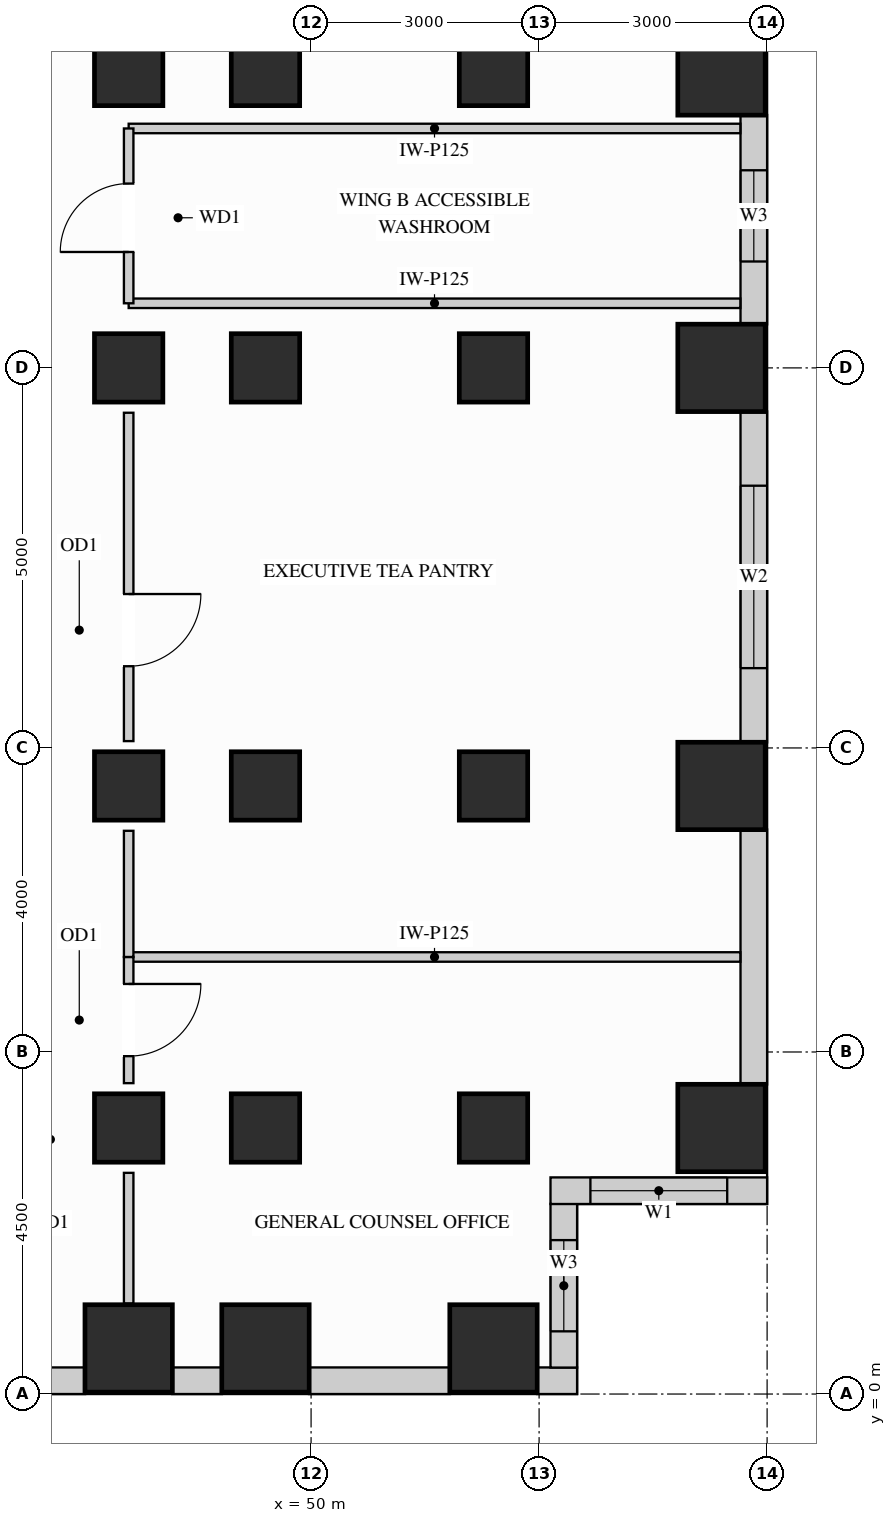
"""IFC4 building model, lengths in metres.
Left out: names, types, materials, properties, quantities, classifications, styles, units other than length and angle.
Written with IfcOpenShell. Run it as: python <this file> out.ifc"""

import sys

from ifc_helpers import new_model, si_unit, direction, frame, frame_2d, origin, origin_2d, place, context, subcontext, project, spatial, rectangle, extrude, source, transform, mapped, element, fill, save


model = new_model("IFC4")
c1 = context("Model", 3, precision=1e-05, world=origin(), true_north=direction((0.0, 1.0)))
c2 = subcontext(c1, "Body", "Model", "MODEL_VIEW")
j1 = project(units=[si_unit("LENGTHUNIT", "METRE"), si_unit("PLANEANGLEUNIT", "RADIAN")], contexts=[c1])
p1 = place(None, origin())
s1 = spatial("IfcSite", under=j1, at=p1, CompositionType="ELEMENT")
p2 = place(p1, origin())
s2 = spatial("IfcBuilding", under=s1, at=p2, CompositionType="ELEMENT")
p3 = place(p2, frame((0.0, 0.0, 88.2)))
s3 = spatial("IfcBuildingStorey", under=s2, at=p3, CompositionType="ELEMENT", Elevation=88.2)
m1 = source(origin(), c2, "Body", "SweptSolid", [
    extrude(rectangle(XDim=0.9, YDim=0.9, at=origin_2d()), origin(), (0.0, 0.0, 1.0), 3.38),
])
for number, where, z_axis, x_axis in (
    (1, (47.6, 13.5, 0.0), (0.0, 0.0, 1.0), (1.0, 0.0, 0.0)),
    (2, (47.6, 3.5, 0.0), (0.0, 0.0, 1.0), (1.0, 0.0, 0.0)),
    (3, (47.6, 8.0, 0.0), (0.0, 0.0, 1.0), (1.0, 0.0, 0.0)),
    (4, (47.6, 17.4, 0.0), (0.0, 0.0, 1.0), (1.0, 0.0, 0.0)),
    (5, (49.4, 13.5, 0.0), (0.0, 0.0, 1.0), (1.0, 0.0, 0.0)),
    (6, (49.4, 17.4, 0.0), (0.0, 0.0, 1.0), (1.0, 0.0, 0.0)),
    (7, (49.4, 3.5, 0.0), (0.0, 0.0, 1.0), (1.0, 0.0, 0.0)),
    (8, (49.4, 8.0, 0.0), (0.0, 0.0, 1.0), (1.0, 0.0, 0.0)),
    (9, (52.4, 13.5, 0.0), (0.0, 0.0, 1.0), (1.0, 0.0, 0.0)),
    (10, (52.4, 17.4, 0.0), (0.0, 0.0, 1.0), (1.0, 0.0, 0.0)),
    (11, (52.4, 3.5, 0.0), (0.0, 0.0, 1.0), (1.0, 0.0, 0.0)),
    (12, (52.4, 8.0, 0.0), (0.0, 0.0, 1.0), (1.0, 0.0, 0.0)),
):
    element("IfcColumn", number, at=place(p3, frame(where, z_axis=z_axis, x_axis=x_axis)), inside=s3, PredefinedType="COLUMN", context=c2, shape_type="MappedRepresentation", body=[
        mapped(m1, transform((0.0, 0.0, 0.0), x_axis=(1.0, 0.0, 0.0), y_axis=(0.0, 1.0, 0.0), z_axis=(0.0, 0.0, 1.0))),
    ])
m2 = source(origin(), c2, "Body", "SweptSolid", [
    extrude(rectangle(XDim=1.15, YDim=1.15, at=origin_2d()), origin(), (0.0, 0.0, 1.0), 3.38),
])
for number, where, z_axis, x_axis in (
    (13, (55.4, 13.5, 0.0), (0.0, 0.0, 1.0), (1.0, 0.0, 0.0)),
    (14, (55.4, 17.4, 0.0), (0.0, 0.0, 1.0), (1.0, 0.0, 0.0)),
    (15, (55.4, 3.5, 0.0), (0.0, 0.0, 1.0), (1.0, 0.0, 0.0)),
    (16, (55.4, 8.0, 0.0), (0.0, 0.0, 1.0), (1.0, 0.0, 0.0)),
    (17, (47.6, 0.6, 0.0), (0.0, 0.0, 1.0), (1.0, 0.0, 0.0)),
    (18, (49.4, 0.6, 0.0), (0.0, 0.0, 1.0), (1.0, 0.0, 0.0)),
    (19, (52.4, 0.6, 0.0), (0.0, 0.0, 1.0), (1.0, 0.0, 0.0)),
):
    element("IfcColumn", number, at=place(p3, frame(where, z_axis=z_axis, x_axis=x_axis)), inside=s3, PredefinedType="COLUMN", context=c2, shape_type="MappedRepresentation", body=[
        mapped(m2, transform((0.0, 0.0, 0.0), x_axis=(1.0, 0.0, 0.0), y_axis=(0.0, 1.0, 0.0), z_axis=(0.0, 0.0, 1.0))),
    ])
p4 = place(p3, frame((40.573, 0.175, 0.0), z_axis=(0.0, 0.0, 1.0), x_axis=(1.0, 0.0, 0.0)))
e20 = element("IfcWall", 20, at=p4, inside=s3, PredefinedType="SOLIDWALL", context=c2, shape_type="SweptSolid", body=[
    extrude(rectangle(XDim=6.454, YDim=0.35, at=frame_2d((3.227, 0.0))), origin(), (0.0, 0.0, 1.0), 2.428),
])
p5 = place(p4, frame((0.712, 0.0, 0.78)))
e21 = element("IfcOpeningElement", 21, at=p5, cuts=e20, PredefinedType="OPENING", context=c2, shape_type="SweptSolid", body=[
    extrude(rectangle(XDim=1.8, YDim=1.468, at=frame_2d((0.9, 0.734))), frame((0.0, 0.185, 0.0), z_axis=(0.0, -1.0, 0.0), x_axis=(1.0, 0.0, 0.0)), (0.0, 0.0, 1.0), 0.37),
])
p6 = place(p4, frame((2.905, 0.0, 0.78)))
e22 = element("IfcOpeningElement", 22, at=p6, cuts=e20, PredefinedType="OPENING", context=c2, shape_type="SweptSolid", body=[
    extrude(rectangle(XDim=1.8, YDim=1.468, at=frame_2d((0.9, 0.734))), frame((0.0, 0.185, 0.0), z_axis=(0.0, -1.0, 0.0), x_axis=(1.0, 0.0, 0.0)), (0.0, 0.0, 1.0), 0.37),
])
m3 = source(origin(), c2, "Body", "SweptSolid", [
    extrude(rectangle(XDim=0.654, YDim=0.35, at=frame_2d((0.327, 0.0))), origin(), (0.0, 0.0, 1.0), 3.365),
])
p7 = place(p3, frame((48.173, 0.175, 0.0), z_axis=(0.0, 0.0, 1.0), x_axis=(1.0, 0.0, 0.0)))
e23 = element("IfcWall", 23, at=p7, inside=s3, PredefinedType="SOLIDWALL", context=c2, shape_type="MappedRepresentation", body=[
    mapped(m3, transform((0.0, 0.0, 0.0), x_axis=(1.0, 0.0, 0.0), y_axis=(0.0, 1.0, 0.0), z_axis=(0.0, 0.0, 1.0))),
])
m4 = source(origin(), c2, "Body", "SweptSolid", [
    extrude(rectangle(XDim=1.854, YDim=0.35, at=frame_2d((0.927, 0.0))), origin(), (0.0, 0.0, 1.0), 3.365),
])
p8 = place(p3, frame((49.973, 0.175, 0.0), z_axis=(0.0, 0.0, 1.0), x_axis=(1.0, 0.0, 0.0)))
e24 = element("IfcWall", 24, at=p8, inside=s3, PredefinedType="SOLIDWALL", context=c2, shape_type="MappedRepresentation", body=[
    mapped(m4, transform((0.0, 0.0, 0.0), x_axis=(1.0, 0.0, 0.0), y_axis=(0.0, 1.0, 0.0), z_axis=(0.0, 0.0, 1.0))),
])
m5 = source(origin(), c2, "Body", "SweptSolid", [
    extrude(rectangle(XDim=0.527, YDim=0.35, at=frame_2d((0.264, 0.0))), origin(), (0.0, 0.0, 1.0), 3.365),
])
p9 = place(p3, frame((52.973, 0.175, 0.0), z_axis=(0.0, 0.0, 1.0), x_axis=(1.0, 0.0, 0.0)))
e25 = element("IfcWall", 25, at=p9, inside=s3, PredefinedType="SOLIDWALL", context=c2, shape_type="MappedRepresentation", body=[
    mapped(m5, transform((0.0, 0.0, 0.0), x_axis=(1.0, 0.0, 0.0), y_axis=(0.0, 1.0, 0.0), z_axis=(0.0, 0.0, 1.0))),
])
p10 = place(p3, frame((53.325, 0.348, 0.0), z_axis=(0.0, 0.0, 1.0), x_axis=(0.0, 1.0, 0.0)))
e26 = element("IfcWall", 26, at=p10, inside=s3, PredefinedType="SOLIDWALL", context=c2, shape_type="SweptSolid", body=[
    extrude(rectangle(XDim=2.154, YDim=0.35, at=frame_2d((1.077, 0.0))), origin(), (0.0, 0.0, 1.0), 3.365),
])
p11 = place(p10, frame((0.477, 0.0, 0.78)))
e27 = element("IfcOpeningElement", 27, at=p11, cuts=e26, PredefinedType="OPENING", context=c2, shape_type="SweptSolid", body=[
    extrude(rectangle(XDim=1.2, YDim=2.1, at=frame_2d((0.6, 1.05))), frame((0.0, 0.185, 0.0), z_axis=(0.0, -1.0, 0.0), x_axis=(1.0, 0.0, 0.0)), (0.0, 0.0, 1.0), 0.37),
])
p12 = place(p3, frame((53.15, 2.675, 0.0), z_axis=(0.0, 0.0, 1.0), x_axis=(1.0, 0.0, 0.0)))
e28 = element("IfcWall", 28, at=p12, inside=s3, PredefinedType="SOLIDWALL", context=c2, shape_type="SweptSolid", body=[
    extrude(rectangle(XDim=2.85, YDim=0.35, at=frame_2d((1.425, 0.0))), origin(), (0.0, 0.0, 1.0), 3.365),
])
p13 = place(p12, frame((0.525, 0.0, 0.78)))
e29 = element("IfcOpeningElement", 29, at=p13, cuts=e28, PredefinedType="OPENING", context=c2, shape_type="SweptSolid", body=[
    extrude(rectangle(XDim=1.8, YDim=2.1, at=frame_2d((0.9, 1.05))), frame((0.0, 0.185, 0.0), z_axis=(0.0, -1.0, 0.0), x_axis=(1.0, 0.0, 0.0)), (0.0, 0.0, 1.0), 0.37),
])
m6 = source(origin(), c2, "Body", "SweptSolid", [
    extrude(rectangle(XDim=3.354, YDim=0.35, at=frame_2d((1.677, 0.0))), origin(), (0.0, 0.0, 1.0), 3.365),
])
p14 = place(p3, frame((55.825, 4.073, 0.0), z_axis=(0.0, 0.0, 1.0), x_axis=(0.0, 1.0, 0.0)))
e30 = element("IfcWall", 30, at=p14, inside=s3, PredefinedType="SOLIDWALL", context=c2, shape_type="MappedRepresentation", body=[
    mapped(m6, transform((0.0, 0.0, 0.0), x_axis=(1.0, 0.0, 0.0), y_axis=(0.0, 1.0, 0.0), z_axis=(0.0, 0.0, 1.0))),
])
p15 = place(p3, frame((55.825, 8.573, 0.0), z_axis=(0.0, 0.0, 1.0), x_axis=(0.0, 1.0, 0.0)))
e31 = element("IfcWall", 31, at=p15, inside=s3, PredefinedType="SOLIDWALL", context=c2, shape_type="SweptSolid", body=[
    extrude(rectangle(XDim=4.354, YDim=0.35, at=frame_2d((2.177, 0.0))), origin(), (0.0, 0.0, 1.0), 3.365),
])
p16 = place(p15, frame((0.977, 0.0, 0.78)))
e32 = element("IfcOpeningElement", 32, at=p16, cuts=e31, PredefinedType="OPENING", context=c2, shape_type="SweptSolid", body=[
    extrude(rectangle(XDim=2.4, YDim=2.1, at=frame_2d((1.2, 1.05))), frame((0.0, 0.185, 0.0), z_axis=(0.0, -1.0, 0.0), x_axis=(1.0, 0.0, 0.0)), (0.0, 0.0, 1.0), 0.37),
])
p17 = place(p3, frame((55.825, 14.073, 0.0), z_axis=(0.0, 0.0, 1.0), x_axis=(0.0, 1.0, 0.0)))
e33 = element("IfcWall", 33, at=p17, inside=s3, PredefinedType="SOLIDWALL", context=c2, shape_type="SweptSolid", body=[
    extrude(rectangle(XDim=2.754, YDim=0.35, at=frame_2d((1.377, 0.0))), origin(), (0.0, 0.0, 1.0), 3.365),
])
p18 = place(p17, frame((0.827, 0.0, 0.78)))
e34 = element("IfcOpeningElement", 34, at=p18, cuts=e33, PredefinedType="OPENING", context=c2, shape_type="SweptSolid", body=[
    extrude(rectangle(XDim=1.2, YDim=2.1, at=frame_2d((0.6, 1.05))), frame((0.0, 0.185, 0.0), z_axis=(0.0, -1.0, 0.0), x_axis=(1.0, 0.0, 0.0)), (0.0, 0.0, 1.0), 0.37),
])
m7 = source(origin(), c2, "Body", "SweptSolid", [
    extrude(rectangle(XDim=8.048, YDim=0.125, at=frame_2d((4.024, 0.0))), origin(), (0.0, 0.0, 1.0), 3.365),
])
p19 = place(p3, frame((47.6, 14.35, 0.0), z_axis=(0.0, 0.0, 1.0), x_axis=(1.0, 0.0, 0.0)))
e35 = element("IfcWall", 35, at=p19, inside=s3, PredefinedType="PARTITIONING", context=c2, shape_type="MappedRepresentation", body=[
    mapped(m7, transform((0.0, 0.0, 0.0), x_axis=(1.0, 0.0, 0.0), y_axis=(0.0, 1.0, 0.0), z_axis=(0.0, 0.0, 1.0))),
])
m8 = source(origin(), c2, "Body", "SweptSolid", [
    extrude(rectangle(XDim=8.048, YDim=0.125, at=frame_2d((4.024, 0.0))), origin(), (0.0, 0.0, 1.0), 2.677),
])
p20 = place(p3, frame((47.6, 16.65, 0.0), z_axis=(0.0, 0.0, 1.0), x_axis=(1.0, 0.0, 0.0)))
e36 = element("IfcWall", 36, at=p20, inside=s3, PredefinedType="PARTITIONING", context=c2, shape_type="MappedRepresentation", body=[
    mapped(m8, transform((0.0, 0.0, 0.0), x_axis=(1.0, 0.0, 0.0), y_axis=(0.0, 1.0, 0.0), z_axis=(0.0, 0.0, 1.0))),
])
p21 = place(p3, frame((47.6, 5.75, 0.0), z_axis=(0.0, 0.0, 1.0), x_axis=(1.0, 0.0, 0.0)))
e37 = element("IfcWall", 37, at=p21, inside=s3, PredefinedType="PARTITIONING", context=c2, shape_type="MappedRepresentation", body=[
    mapped(m7, transform((0.0, 0.0, 0.0), x_axis=(1.0, 0.0, 0.0), y_axis=(0.0, 1.0, 0.0), z_axis=(0.0, 0.0, 1.0))),
])
p22 = place(p3, frame((47.6, 4.09, 0.0), z_axis=(0.0, 0.0, 1.0), x_axis=(0.0, 1.0, 0.0)))
e38 = element("IfcWall", 38, at=p22, inside=s3, PredefinedType="PARTITIONING", context=c2, shape_type="SweptSolid", body=[
    extrude(rectangle(XDim=1.66, YDim=0.125, at=frame_2d((0.83, 0.0))), origin(), (0.0, 0.0, 1.0), 2.677),
])
p23 = place(p22, frame((0.355, 0.0, 0.0)))
e39 = element("IfcOpeningElement", 39, at=p23, cuts=e38, PredefinedType="OPENING", context=c2, shape_type="SweptSolid", body=[
    extrude(rectangle(XDim=0.95, YDim=2.15, at=frame_2d((0.475, 1.075))), frame((0.0, 0.073, 0.0), z_axis=(0.0, -1.0, 0.0), x_axis=(1.0, 0.0, 0.0)), (0.0, 0.0, 1.0), 0.145),
])
m9 = source(origin(), c2, "Body", "SweptSolid", [
    extrude(rectangle(XDim=1.72, YDim=0.125, at=frame_2d((0.86, 0.0))), origin(), (0.0, 0.0, 1.0), 2.677),
])
p24 = place(p3, frame((47.6, 1.19, 0.0), z_axis=(0.0, 0.0, 1.0), x_axis=(0.0, 1.0, 0.0)))
e40 = element("IfcWall", 40, at=p24, inside=s3, PredefinedType="PARTITIONING", context=c2, shape_type="MappedRepresentation", body=[
    mapped(m9, transform((0.0, 0.0, 0.0), x_axis=(1.0, 0.0, 0.0), y_axis=(0.0, 1.0, 0.0), z_axis=(0.0, 0.0, 1.0))),
])
m10 = source(origin(), c2, "Body", "SweptSolid", [
    extrude(rectangle(XDim=1.66, YDim=0.125, at=frame_2d((0.83, 0.0))), origin(), (0.0, 0.0, 1.0), 2.677),
])
p25 = place(p3, frame((47.6, 5.75, 0.0), z_axis=(0.0, 0.0, 1.0), x_axis=(0.0, 1.0, 0.0)))
e41 = element("IfcWall", 41, at=p25, inside=s3, PredefinedType="PARTITIONING", context=c2, shape_type="MappedRepresentation", body=[
    mapped(m10, transform((0.0, 0.0, 0.0), x_axis=(1.0, 0.0, 0.0), y_axis=(0.0, 1.0, 0.0), z_axis=(0.0, 0.0, 1.0))),
])
p26 = place(p3, frame((47.6, 8.59, 0.0), z_axis=(0.0, 0.0, 1.0), x_axis=(0.0, 1.0, 0.0)))
e42 = element("IfcWall", 42, at=p26, inside=s3, PredefinedType="PARTITIONING", context=c2, shape_type="SweptSolid", body=[
    extrude(rectangle(XDim=4.32, YDim=0.125, at=frame_2d((2.16, 0.0))), origin(), (0.0, 0.0, 1.0), 2.677),
])
p27 = place(p26, frame((0.985, 0.0, 0.0)))
e43 = element("IfcOpeningElement", 43, at=p27, cuts=e42, PredefinedType="OPENING", context=c2, shape_type="SweptSolid", body=[
    extrude(rectangle(XDim=0.95, YDim=2.15, at=frame_2d((0.475, 1.075))), frame((0.0, 0.073, 0.0), z_axis=(0.0, -1.0, 0.0), x_axis=(1.0, 0.0, 0.0)), (0.0, 0.0, 1.0), 0.145),
])
p28 = place(p3, frame((47.6, 14.35, 0.0), z_axis=(0.0, 0.0, 1.0), x_axis=(0.0, 1.0, 0.0)))
e44 = element("IfcWall", 44, at=p28, inside=s3, PredefinedType="PARTITIONING", context=c2, shape_type="SweptSolid", body=[
    extrude(rectangle(XDim=2.3, YDim=0.125, at=frame_2d((1.15, 0.0))), origin(), (0.0, 0.0, 1.0), 2.677),
])
p29 = place(p28, frame((0.675, 0.0, 0.0)))
e45 = element("IfcOpeningElement", 45, at=p29, cuts=e44, PredefinedType="OPENING", context=c2, shape_type="SweptSolid", body=[
    extrude(rectangle(XDim=0.9, YDim=2.15, at=frame_2d((0.45, 1.075))), frame((0.0, 0.073, 0.0), z_axis=(0.0, -1.0, 0.0), x_axis=(1.0, 0.0, 0.0)), (0.0, 0.0, 1.0), 0.145),
])
m11 = source(origin(), c2, "Body", "SweptSolid", [
    extrude(rectangle(XDim=0.95, YDim=2.15, at=frame_2d((0.475, 1.075))), frame((0.0, 0.025, 0.0), z_axis=(0.0, -1.0, 0.0), x_axis=(1.0, 0.0, 0.0)), (0.0, 0.0, 1.0), 0.05),
])
p30 = place(p23, origin())
e46 = element("IfcDoor", 46, at=p30, inside=s3, OperationType="SINGLE_SWING_RIGHT", PredefinedType="DOOR", context=c2, shape_type="MappedRepresentation", body=[
    mapped(m11, transform((0.0, 0.0, 0.0), x_axis=(1.0, 0.0, 0.0), y_axis=(0.0, 1.0, 0.0), z_axis=(0.0, 0.0, 1.0))),
])
fill(e39, e46)
p31 = place(p27, origin())
e47 = element("IfcDoor", 47, at=p31, inside=s3, OperationType="SINGLE_SWING_RIGHT", PredefinedType="DOOR", context=c2, shape_type="MappedRepresentation", body=[
    mapped(m11, transform((0.0, 0.0, 0.0), x_axis=(1.0, 0.0, 0.0), y_axis=(0.0, 1.0, 0.0), z_axis=(0.0, 0.0, 1.0))),
])
fill(e43, e47)
m12 = source(origin(), c2, "Body", "SweptSolid", [
    extrude(rectangle(XDim=0.9, YDim=2.15, at=frame_2d((0.45, 1.075))), frame((0.0, 0.025, 0.0), z_axis=(0.0, -1.0, 0.0), x_axis=(1.0, 0.0, 0.0)), (0.0, 0.0, 1.0), 0.05),
])
p32 = place(p29, origin())
e48 = element("IfcDoor", 48, at=p32, inside=s3, OperationType="SINGLE_SWING_LEFT", PredefinedType="DOOR", context=c2, shape_type="MappedRepresentation", body=[
    mapped(m12, transform((0.0, 0.0, 0.0), x_axis=(1.0, 0.0, 0.0), y_axis=(0.0, 1.0, 0.0), z_axis=(0.0, 0.0, 1.0))),
])
fill(e45, e48)
m13 = source(origin(), c2, "Body", "SweptSolid", [
    extrude(rectangle(XDim=1.8, YDim=2.1, at=frame_2d((0.9, 1.05))), frame((0.0, 0.03, 0.0), z_axis=(0.0, -1.0, 0.0), x_axis=(1.0, 0.0, 0.0)), (0.0, 0.0, 1.0), 0.06),
])
p33 = place(p13, origin())
e49 = element("IfcWindow", 49, at=p33, inside=s3, PartitioningType="SINGLE_PANEL", PredefinedType="WINDOW", context=c2, shape_type="MappedRepresentation", body=[
    mapped(m13, transform((0.0, 0.0, 0.0), x_axis=(1.0, 0.0, 0.0), y_axis=(0.0, 1.0, 0.0), z_axis=(0.0, 0.0, 1.0))),
])
fill(e29, e49)
m14 = source(origin(), c2, "Body", "SweptSolid", [
    extrude(rectangle(XDim=2.4, YDim=2.1, at=frame_2d((1.2, 1.05))), frame((0.0, 0.03, 0.0), z_axis=(0.0, -1.0, 0.0), x_axis=(1.0, 0.0, 0.0)), (0.0, 0.0, 1.0), 0.06),
])
p34 = place(p16, origin())
e50 = element("IfcWindow", 50, at=p34, inside=s3, PartitioningType="SINGLE_PANEL", PredefinedType="WINDOW", context=c2, shape_type="MappedRepresentation", body=[
    mapped(m14, transform((0.0, 0.0, 0.0), x_axis=(1.0, 0.0, 0.0), y_axis=(0.0, 1.0, 0.0), z_axis=(0.0, 0.0, 1.0))),
])
fill(e32, e50)
m15 = source(origin(), c2, "Body", "SweptSolid", [
    extrude(rectangle(XDim=1.2, YDim=2.1, at=frame_2d((0.6, 1.05))), frame((0.0, 0.03, 0.0), z_axis=(0.0, -1.0, 0.0), x_axis=(1.0, 0.0, 0.0)), (0.0, 0.0, 1.0), 0.06),
])
p35 = place(p11, origin())
e51 = element("IfcWindow", 51, at=p35, inside=s3, PartitioningType="SINGLE_PANEL", PredefinedType="WINDOW", context=c2, shape_type="MappedRepresentation", body=[
    mapped(m15, transform((0.0, 0.0, 0.0), x_axis=(1.0, 0.0, 0.0), y_axis=(0.0, 1.0, 0.0), z_axis=(0.0, 0.0, 1.0))),
])
fill(e27, e51)
p36 = place(p18, origin())
e52 = element("IfcWindow", 52, at=p36, inside=s3, PartitioningType="SINGLE_PANEL", PredefinedType="WINDOW", context=c2, shape_type="MappedRepresentation", body=[
    mapped(m15, transform((0.0, 0.0, 0.0), x_axis=(1.0, 0.0, 0.0), y_axis=(0.0, 1.0, 0.0), z_axis=(0.0, 0.0, 1.0))),
])
fill(e34, e52)
save(model, sys.argv[1])
